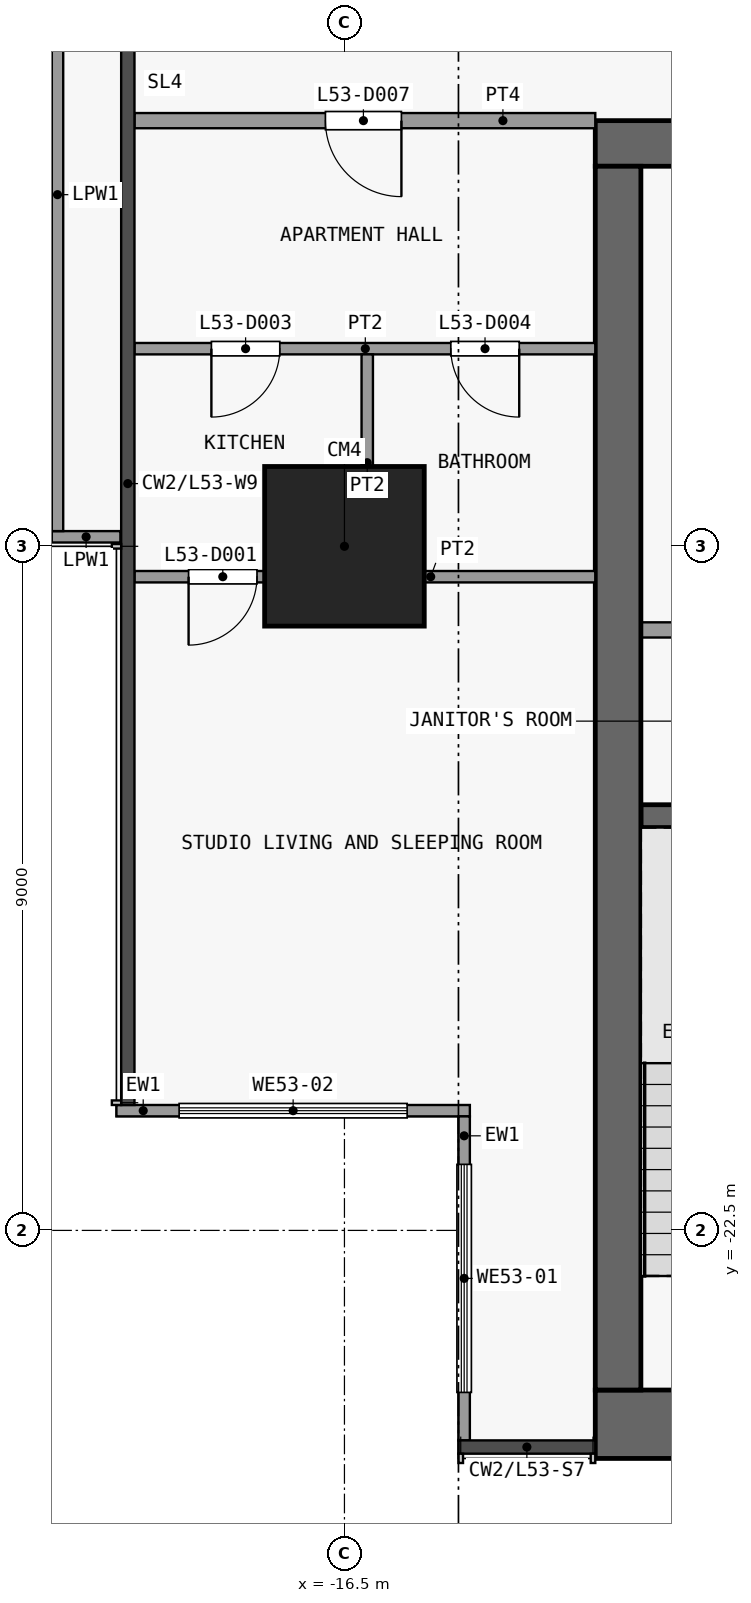
"""IFC4 building model, lengths in metres.
Left out: names, types, materials, properties, quantities, classifications, styles, units other than length and angle.
Written with IfcOpenShell. Run it as: python <this file> out.ifc"""

import sys

from ifc_helpers import new_model, si_unit, direction, frame, frame_2d, origin, origin_2d, place, context, subcontext, project, spatial, rectangle, extrude, element, fill, save


model = new_model("IFC4")
c1 = context("Model", 3, precision=1e-05, world=origin(), true_north=direction((0.0, 1.0)))
c2 = subcontext(c1, "Body", "Model", "MODEL_VIEW")
j1 = project(units=[si_unit("LENGTHUNIT", "METRE"), si_unit("PLANEANGLEUNIT", "RADIAN")], contexts=[c1])
p1 = place(None, origin())
s1 = spatial("IfcSite", under=j1, at=p1, CompositionType="ELEMENT")
p2 = place(p1, origin())
s2 = spatial("IfcBuilding", under=s1, at=p2, CompositionType="ELEMENT")
p3 = place(p2, frame((0.0, 0.0, 212.3)))
s3 = spatial("IfcBuildingStorey", under=s2, at=p3, CompositionType="ELEMENT", Elevation=212.3)
p4 = place(p3, frame((-16.5, -13.5, 0.0), z_axis=(0.0, 0.0, 1.0), x_axis=(1.0, 0.0, 0.0)))
e1 = element("IfcColumn", 1, at=p4, inside=s3, PredefinedType="COLUMN", context=c2, shape_type="SweptSolid", body=[
    extrude(rectangle(XDim=2.1, YDim=2.1, at=origin_2d()), origin(), (0.0, 0.0, 1.0), 3.6),
])
p5 = place(p3, frame((-13.2, -25.05, 0.0), z_axis=(0.0, 0.0, 1.0), x_axis=(1.0, 0.0, 0.0)))
e2 = element("IfcWall", 2, at=p5, inside=s3, PredefinedType="SHEAR", context=c2, shape_type="SweptSolid", body=[
    extrude(rectangle(XDim=26.4, YDim=0.9, at=frame_2d((13.2, 0.0))), origin(), (0.0, 0.0, 1.0), 3.3),
])
p6 = place(p3, frame((-13.2, -8.2, 0.0), z_axis=(0.0, 0.0, 1.0), x_axis=(1.0, 0.0, 0.0)))
e3 = element("IfcWall", 3, at=p6, inside=s3, PredefinedType="SHEAR", context=c2, shape_type="SweptSolid", body=[
    extrude(rectangle(XDim=26.4, YDim=0.6, at=frame_2d((13.2, 0.0))), origin(), (0.0, 0.0, 1.0), 3.3),
])
p7 = place(p6, frame((7.5, 0.0, 0.0)))
e4 = element("IfcOpeningElement", 4, at=p7, cuts=e3, PredefinedType="OPENING", context=c2, shape_type="SweptSolid", body=[
    extrude(rectangle(XDim=1.8, YDim=2.1, at=frame_2d((0.9, 1.05))), frame((0.0, 0.31, 0.0), z_axis=(0.0, -1.0, 0.0), x_axis=(1.0, 0.0, 0.0)), (0.0, 0.0, 1.0), 0.62),
])
p8 = place(p6, frame((17.1, 0.0, 0.0)))
e5 = element("IfcOpeningElement", 5, at=p8, cuts=e3, PredefinedType="OPENING", context=c2, shape_type="SweptSolid", body=[
    extrude(rectangle(XDim=1.8, YDim=2.1, at=frame_2d((0.9, 1.05))), frame((0.0, 0.31, 0.0), z_axis=(0.0, -1.0, 0.0), x_axis=(1.0, 0.0, 0.0)), (0.0, 0.0, 1.0), 0.62),
])
p9 = place(p6, frame((2.425, 0.0, 0.0)))
e6 = element("IfcOpeningElement", 6, at=p9, cuts=e3, PredefinedType="OPENING", context=c2, shape_type="SweptSolid", body=[
    extrude(rectangle(XDim=0.9, YDim=2.1, at=frame_2d((0.45, 1.05))), frame((0.0, 0.31, 0.0), z_axis=(0.0, -1.0, 0.0), x_axis=(1.0, 0.0, 0.0)), (0.0, 0.0, 1.0), 0.62),
])
p10 = place(p6, frame((23.075, 0.0, 0.0)))
e7 = element("IfcOpeningElement", 7, at=p10, cuts=e3, PredefinedType="OPENING", context=c2, shape_type="SweptSolid", body=[
    extrude(rectangle(XDim=0.9, YDim=2.1, at=frame_2d((0.45, 1.05))), frame((0.0, 0.31, 0.0), z_axis=(0.0, -1.0, 0.0), x_axis=(1.0, 0.0, 0.0)), (0.0, 0.0, 1.0), 0.62),
])
p11 = place(p3, frame((-12.9, -24.6, 0.0), z_axis=(0.0, 0.0, 1.0), x_axis=(0.0, 1.0, 0.0)))
e8 = element("IfcWall", 8, at=p11, inside=s3, PredefinedType="SHEAR", context=c2, shape_type="SweptSolid", body=[
    extrude(rectangle(XDim=16.1, YDim=0.6, at=frame_2d((8.05, 0.0))), origin(), (0.0, 0.0, 1.0), 3.3),
])
p12 = place(p3, frame((-12.6, -17.05, 0.0), z_axis=(0.0, 0.0, 1.0), x_axis=(1.0, 0.0, 0.0)))
e9 = element("IfcWall", 9, at=p12, inside=s3, PredefinedType="SHEAR", context=c2, shape_type="SweptSolid", body=[
    extrude(rectangle(XDim=3.1, YDim=0.3, at=frame_2d((1.55, 0.0))), origin(), (0.0, 0.0, 1.0), 3.3),
])
p13 = place(p3, frame((-12.6, -14.6, 0.0), z_axis=(0.0, 0.0, 1.0), x_axis=(1.0, 0.0, 0.0)))
e10 = element("IfcWall", 10, at=p13, inside=s3, PredefinedType="PARTITIONING", context=c2, shape_type="SweptSolid", body=[
    extrude(rectangle(XDim=1.45, YDim=0.2, at=frame_2d((0.725, 0.0))), origin(), (0.0, 0.0, 1.0), 3.3),
])
p14 = place(p3, frame((-14.925, -25.262, 0.0), z_axis=(0.0, 0.0, 1.0), x_axis=(0.0, 1.0, 0.0)))
e11 = element("IfcWall", 11, at=p14, inside=s3, PredefinedType="SOLIDWALL", context=c2, shape_type="SweptSolid", body=[
    extrude(rectangle(XDim=4.262, YDim=0.15, at=frame_2d((2.131, 0.0))), origin(), (0.0, 0.0, 1.0), 3.3),
])
p15 = place(p14, frame((0.631, 0.0, 0.9)))
e12 = element("IfcOpeningElement", 12, at=p15, cuts=e11, PredefinedType="OPENING", context=c2, shape_type="SweptSolid", body=[
    extrude(rectangle(XDim=3.0, YDim=2.4, at=frame_2d((1.5, 1.2))), frame((0.0, 0.085, 0.0), z_axis=(0.0, -1.0, 0.0), x_axis=(1.0, 0.0, 0.0)), (0.0, 0.0, 1.0), 0.17),
])
p16 = place(p3, frame((-14.85, -20.925, 0.0), z_axis=(0.0, 0.0, 1.0), x_axis=(-1.0, 0.0, 0.0)))
e13 = element("IfcWall", 13, at=p16, inside=s3, PredefinedType="SOLIDWALL", context=c2, shape_type="SweptSolid", body=[
    extrude(rectangle(XDim=4.65, YDim=0.15, at=frame_2d((2.325, 0.0))), origin(), (0.0, 0.0, 1.0), 3.3),
])
p17 = place(p16, frame((0.825, 0.0, 0.9)))
e14 = element("IfcOpeningElement", 14, at=p17, cuts=e13, PredefinedType="OPENING", context=c2, shape_type="SweptSolid", body=[
    extrude(rectangle(XDim=3.0, YDim=2.4, at=frame_2d((1.5, 1.2))), frame((0.0, 0.085, 0.0), z_axis=(0.0, -1.0, 0.0), x_axis=(1.0, 0.0, 0.0)), (0.0, 0.0, 1.0), 0.17),
])
p18 = place(p3, frame((-19.448, -13.375, 0.0), z_axis=(0.0, 0.0, 1.0), x_axis=(-1.0, 0.0, 0.0)))
e15 = element("IfcWall", 15, at=p18, inside=s3, PredefinedType="PARAPET", context=c2, shape_type="SweptSolid", body=[
    extrude(rectangle(XDim=0.903, YDim=0.15, at=frame_2d((0.451, 0.0))), origin(), (0.0, 0.0, 1.0), 1.15),
])
p19 = place(p3, frame((-20.275, -13.3, 0.0), z_axis=(0.0, 0.0, 1.0), x_axis=(0.0, 1.0, 0.0)))
e16 = element("IfcWall", 16, at=p19, inside=s3, PredefinedType="PARAPET", context=c2, shape_type="SweptSolid", body=[
    extrude(rectangle(XDim=8.853, YDim=0.15, at=frame_2d((4.426, 0.0))), origin(), (0.0, 0.0, 1.0), 1.15),
])
p20 = place(p3, frame((-19.262, -13.9, 0.0), z_axis=(0.0, 0.0, 1.0), x_axis=(1.0, 0.0, 0.0)))
e17 = element("IfcWall", 17, at=p20, inside=s3, PredefinedType="PARTITIONING", context=c2, shape_type="SweptSolid", body=[
    extrude(rectangle(XDim=6.062, YDim=0.15, at=frame_2d((3.031, 0.0))), origin(), (0.0, 0.0, 1.0), 3.3),
])
p21 = place(p20, frame((0.712, 0.0, 0.0)))
e18 = element("IfcOpeningElement", 18, at=p21, cuts=e17, PredefinedType="OPENING", context=c2, shape_type="SweptSolid", body=[
    extrude(rectangle(XDim=0.9, YDim=2.1, at=frame_2d((0.45, 1.05))), frame((0.0, 0.085, 0.0), z_axis=(0.0, -1.0, 0.0), x_axis=(1.0, 0.0, 0.0)), (0.0, 0.0, 1.0), 0.17),
])
p22 = place(p3, frame((-19.262, -10.9, 0.0), z_axis=(0.0, 0.0, 1.0), x_axis=(1.0, 0.0, 0.0)))
e19 = element("IfcWall", 19, at=p22, inside=s3, PredefinedType="PARTITIONING", context=c2, shape_type="SweptSolid", body=[
    extrude(rectangle(XDim=6.062, YDim=0.15, at=frame_2d((3.031, 0.0))), origin(), (0.0, 0.0, 1.0), 3.3),
])
p23 = place(p22, frame((1.012, 0.0, 0.0)))
e20 = element("IfcOpeningElement", 20, at=p23, cuts=e19, PredefinedType="OPENING", context=c2, shape_type="SweptSolid", body=[
    extrude(rectangle(XDim=0.9, YDim=2.1, at=frame_2d((0.45, 1.05))), frame((0.0, 0.085, 0.0), z_axis=(0.0, -1.0, 0.0), x_axis=(1.0, 0.0, 0.0)), (0.0, 0.0, 1.0), 0.17),
])
p24 = place(p22, frame((4.162, 0.0, 0.0)))
e21 = element("IfcOpeningElement", 21, at=p24, cuts=e19, PredefinedType="OPENING", context=c2, shape_type="SweptSolid", body=[
    extrude(rectangle(XDim=0.9, YDim=2.1, at=frame_2d((0.45, 1.05))), frame((0.0, 0.085, 0.0), z_axis=(0.0, -1.0, 0.0), x_axis=(1.0, 0.0, 0.0)), (0.0, 0.0, 1.0), 0.17),
])
p25 = place(p3, frame((-19.262, -7.9, 0.0), z_axis=(0.0, 0.0, 1.0), x_axis=(1.0, 0.0, 0.0)))
e22 = element("IfcWall", 22, at=p25, inside=s3, PredefinedType="PARTITIONING", context=c2, shape_type="SweptSolid", body=[
    extrude(rectangle(XDim=6.062, YDim=0.2, at=frame_2d((3.031, 0.0))), origin(), (0.0, 0.0, 1.0), 3.3),
])
p26 = place(p25, frame((2.512, 0.0, 0.0)))
e23 = element("IfcOpeningElement", 23, at=p26, cuts=e22, PredefinedType="OPENING", context=c2, shape_type="SweptSolid", body=[
    extrude(rectangle(XDim=1.0, YDim=2.1, at=frame_2d((0.5, 1.05))), frame((0.0, 0.11, 0.0), z_axis=(0.0, -1.0, 0.0), x_axis=(1.0, 0.0, 0.0)), (0.0, 0.0, 1.0), 0.22),
])
p27 = place(p3, frame((-16.2, -13.825, 0.0), z_axis=(0.0, 0.0, 1.0), x_axis=(0.0, 1.0, 0.0)))
e24 = element("IfcWall", 24, at=p27, inside=s3, PredefinedType="PARTITIONING", context=c2, shape_type="SweptSolid", body=[
    extrude(rectangle(XDim=2.85, YDim=0.15, at=frame_2d((1.425, 0.0))), origin(), (0.0, 0.0, 1.0), 3.3),
])
p28 = place(p15, origin())
e25 = element("IfcWindow", 25, at=p28, inside=s3, PartitioningType="SINGLE_PANEL", PredefinedType="WINDOW", context=c2, shape_type="SweptSolid", body=[
    extrude(rectangle(XDim=3.0, YDim=2.4, at=frame_2d((1.5, 1.2))), frame((0.0, 0.03, 0.0), z_axis=(0.0, -1.0, 0.0), x_axis=(1.0, 0.0, 0.0)), (0.0, 0.0, 1.0), 0.06),
])
fill(e12, e25)
p29 = place(p17, origin())
e26 = element("IfcWindow", 26, at=p29, inside=s3, PartitioningType="SINGLE_PANEL", PredefinedType="WINDOW", context=c2, shape_type="SweptSolid", body=[
    extrude(rectangle(XDim=3.0, YDim=2.4, at=frame_2d((1.5, 1.2))), frame((0.0, 0.03, 0.0), z_axis=(0.0, -1.0, 0.0), x_axis=(1.0, 0.0, 0.0)), (0.0, 0.0, 1.0), 0.06),
])
fill(e14, e26)
p30 = place(p21, origin())
e27 = element("IfcDoor", 27, at=p30, inside=s3, OperationType="SINGLE_SWING_LEFT", PredefinedType="DOOR", context=c2, shape_type="SweptSolid", body=[
    extrude(rectangle(XDim=0.9, YDim=2.1, at=frame_2d((0.45, 1.05))), frame((0.0, 0.025, 0.0), z_axis=(0.0, -1.0, 0.0), x_axis=(1.0, 0.0, 0.0)), (0.0, 0.0, 1.0), 0.05),
])
fill(e18, e27)
p31 = place(p23, origin())
e28 = element("IfcDoor", 28, at=p31, inside=s3, OperationType="SINGLE_SWING_LEFT", PredefinedType="DOOR", context=c2, shape_type="SweptSolid", body=[
    extrude(rectangle(XDim=0.9, YDim=2.1, at=frame_2d((0.45, 1.05))), frame((0.0, 0.025, 0.0), z_axis=(0.0, -1.0, 0.0), x_axis=(1.0, 0.0, 0.0)), (0.0, 0.0, 1.0), 0.05),
])
fill(e20, e28)
p32 = place(p24, origin())
e29 = element("IfcDoor", 29, at=p32, inside=s3, OperationType="SINGLE_SWING_RIGHT", PredefinedType="DOOR", context=c2, shape_type="SweptSolid", body=[
    extrude(rectangle(XDim=0.9, YDim=2.1, at=frame_2d((0.45, 1.05))), frame((0.0, 0.025, 0.0), z_axis=(0.0, -1.0, 0.0), x_axis=(1.0, 0.0, 0.0)), (0.0, 0.0, 1.0), 0.05),
])
fill(e21, e29)
p33 = place(p26, origin())
e30 = element("IfcDoor", 30, at=p33, inside=s3, OperationType="SINGLE_SWING_RIGHT", PredefinedType="DOOR", context=c2, shape_type="SweptSolid", body=[
    extrude(rectangle(XDim=1.0, YDim=2.1, at=frame_2d((0.5, 1.05))), frame((0.0, 0.025, 0.0), z_axis=(0.0, -1.0, 0.0), x_axis=(1.0, 0.0, 0.0)), (0.0, 0.0, 1.0), 0.05),
])
fill(e23, e30)
save(model, sys.argv[1])
